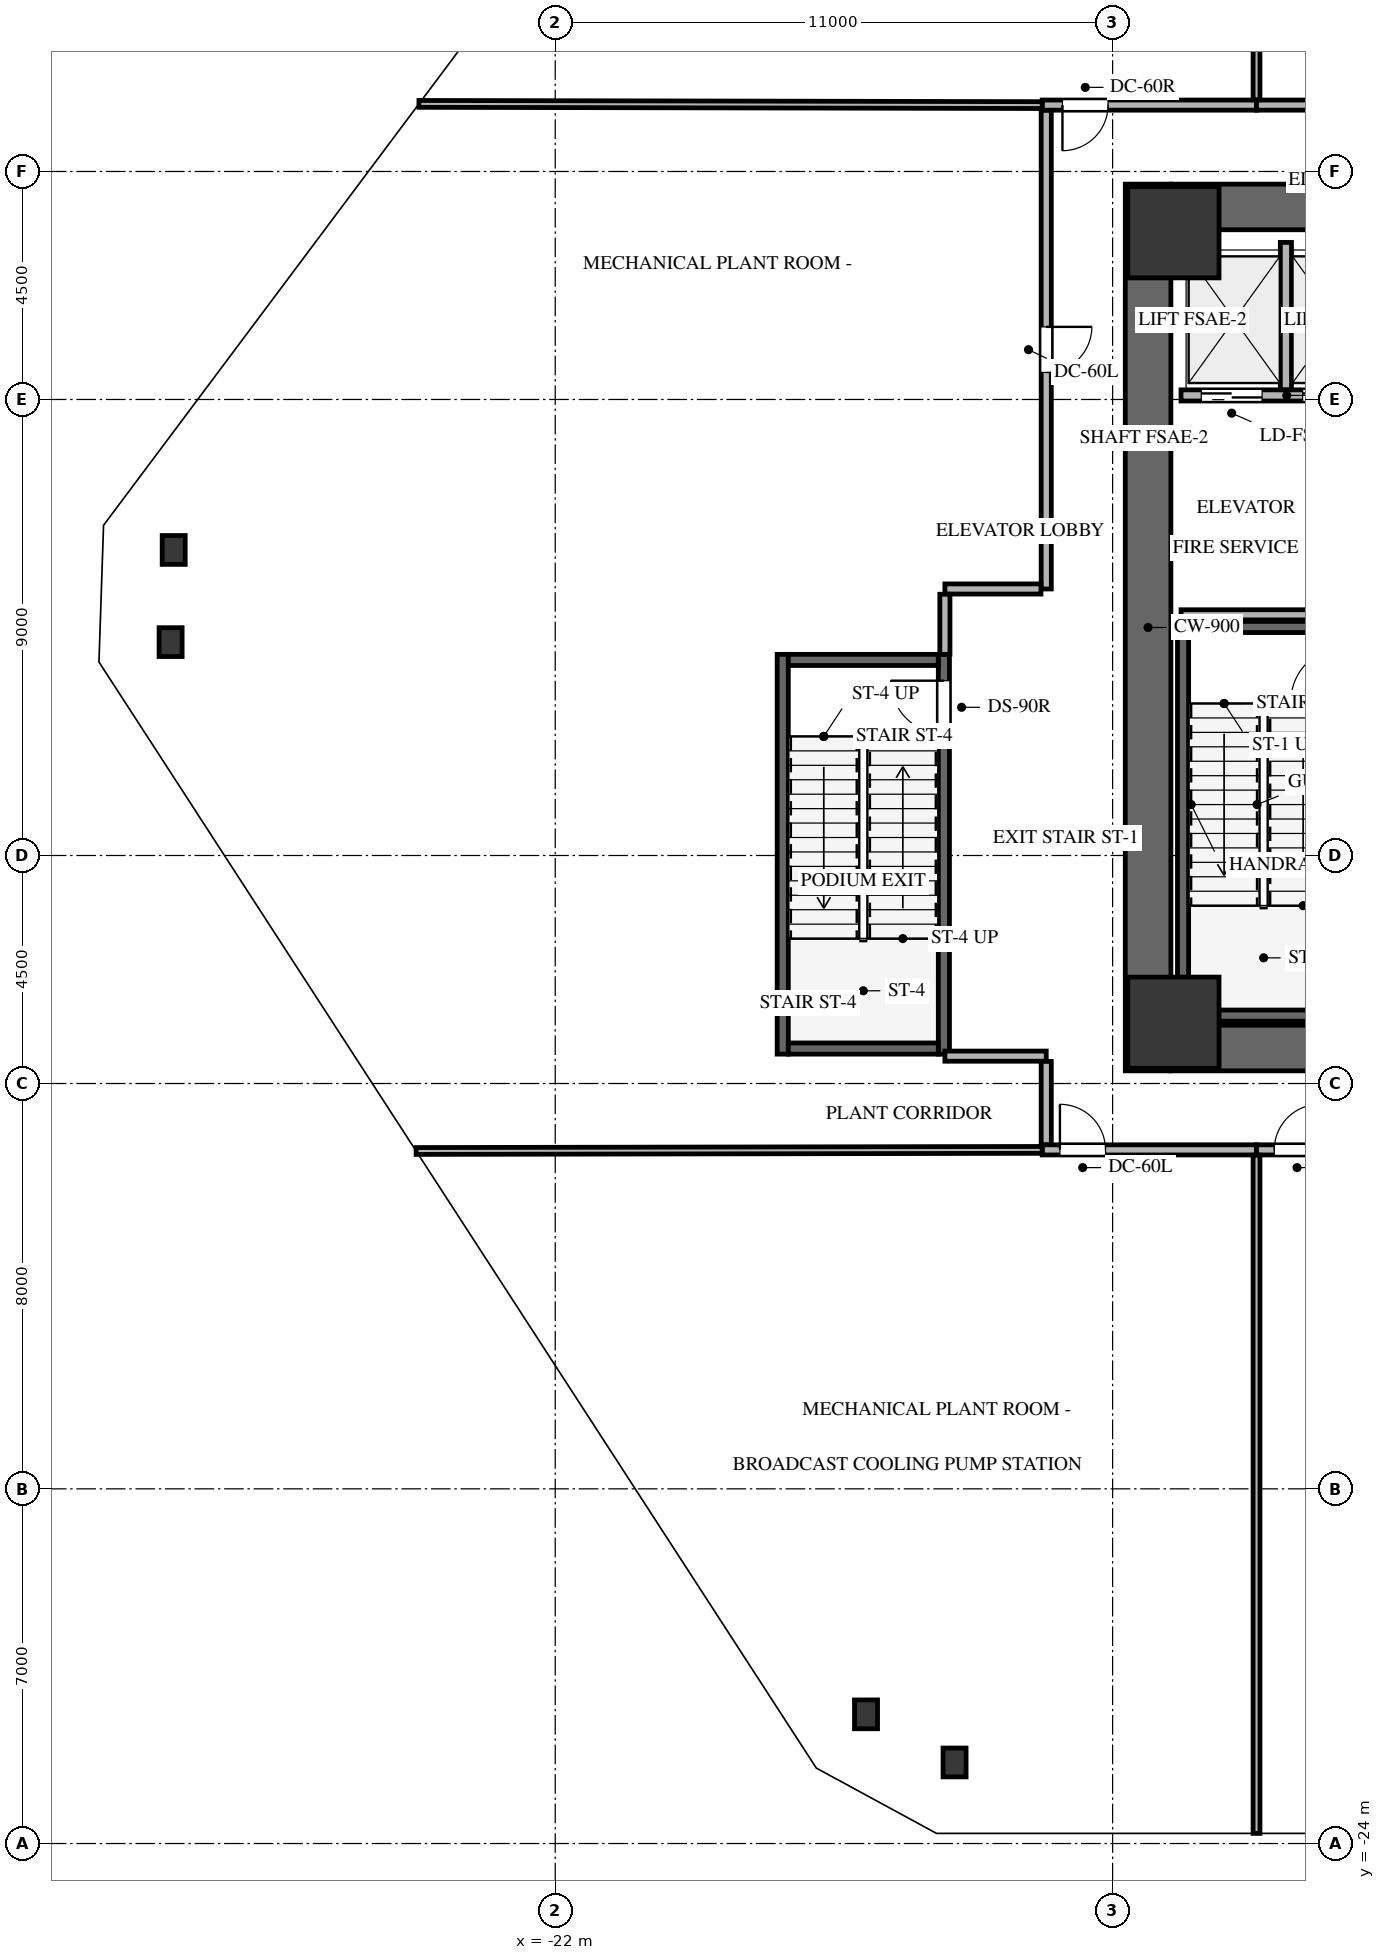
"""IFC4 building model, lengths in metres.
Left out: names, types, materials, properties, quantities, classifications, styles, units other than length and angle.
Written with IfcOpenShell. Run it as: python <this file> out.ifc"""

import sys

from ifc_helpers import new_model, si_unit, direction, frame, frame_2d, origin, origin_2d, place, context, subcontext, project, spatial, rectangle, i_section, extrude, source, transform, mapped, element, fill, save


model = new_model("IFC4")
c1 = context("Model", 3, precision=1e-05, world=origin(), true_north=direction((0.0, 1.0)))
c2 = subcontext(c1, "Body", "Model", "MODEL_VIEW")
j1 = project(units=[si_unit("LENGTHUNIT", "METRE"), si_unit("PLANEANGLEUNIT", "RADIAN")], contexts=[c1])
p1 = place(None, origin())
s1 = spatial("IfcSite", under=j1, at=p1, CompositionType="ELEMENT")
p2 = place(p1, origin())
s2 = spatial("IfcBuilding", under=s1, at=p2, CompositionType="ELEMENT")
p3 = place(p2, frame((0.0, 0.0, 10.4)))
s3 = spatial("IfcBuildingStorey", under=s2, at=p3, CompositionType="ELEMENT", Elevation=10.4)
p4 = place(p3, frame((-10.3, -8.75, 0.0), z_axis=(0.0, 0.0, 1.0), x_axis=(0.0, 1.0, 0.0)))
e1 = element("IfcWall", 1, at=p4, inside=s3, PredefinedType="SHEAR", context=c2, shape_type="SweptSolid", body=[
    extrude(rectangle(XDim=17.5, YDim=0.9, at=frame_2d((8.75, 0.0))), origin(), (0.0, 0.0, 1.0), 5.2),
])
p5 = place(p3, frame((-9.85, -8.3, 0.0), z_axis=(0.0, 0.0, 1.0), x_axis=(1.0, 0.0, 0.0)))
e2 = element("IfcWall", 2, at=p5, inside=s3, PredefinedType="SHEAR", context=c2, shape_type="SweptSolid", body=[
    extrude(rectangle(XDim=7.75, YDim=0.9, at=frame_2d((3.875, 0.0))), origin(), (0.0, 0.0, 1.0), 5.2),
])
p6 = place(p3, frame((-9.85, 8.3, 0.0), z_axis=(0.0, 0.0, 1.0), x_axis=(1.0, 0.0, 0.0)))
e3 = element("IfcWall", 3, at=p6, inside=s3, PredefinedType="SHEAR", context=c2, shape_type="SweptSolid", body=[
    extrude(rectangle(XDim=19.7, YDim=0.9, at=frame_2d((9.85, 0.0))), origin(), (0.0, 0.0, 1.0), 5.2),
])
p7 = place(p3, frame((-9.61, 0.12, -0.35), z_axis=(0.0, 0.0, 1.0), x_axis=(0.0, -1.0, 0.0)))
e4 = element("IfcWall", 4, at=p7, inside=s3, PredefinedType="SHEAR", context=c2, shape_type="SweptSolid", body=[
    extrude(rectangle(XDim=7.89, YDim=0.22, at=frame_2d((3.945, 0.0))), origin(), (0.0, 0.0, 1.0), 5.23),
])
for number, where, z_axis, x_axis in (
    (5, (-9.5, -7.66, -0.35), (0.0, 0.0, 1.0), (1.0, 0.0, 0.0)),
    (6, (-6.54, 0.01, -0.35), (0.0, 0.0, 1.0), (-1.0, 0.0, 0.0)),
):
    element("IfcWall", number, at=place(p3, frame(where, z_axis=z_axis, x_axis=x_axis)), inside=s3, PredefinedType="SHEAR", context=c2, shape_type="SweptSolid", body=[
        extrude(rectangle(XDim=2.96, YDim=0.22, at=frame_2d((1.48, 0.0))), origin(), (0.0, 0.0, 1.0), 5.23),
    ])
p8 = place(p3, frame((-14.33, -8.42, -0.35), z_axis=(0.0, 0.0, 1.0), x_axis=(0.0, 1.0, 0.0)))
e7 = element("IfcWall", 7, at=p8, inside=s3, PredefinedType="SHEAR", context=c2, shape_type="SweptSolid", body=[
    extrude(rectangle(XDim=7.89, YDim=0.22, at=frame_2d((3.945, 0.0))), origin(), (0.0, 0.0, 1.0), 5.23),
])
p9 = place(p8, frame((6.32, 0.0, 0.0)))
e8 = element("IfcOpeningElement", 8, at=p9, cuts=e7, PredefinedType="OPENING", context=c2, shape_type="SweptSolid", body=[
    extrude(rectangle(XDim=1.05, YDim=2.15, at=frame_2d((0.525, 1.075))), frame((0.0, 0.12, 0.0), z_axis=(0.0, -1.0, 0.0), x_axis=(1.0, 0.0, 0.0)), (0.0, 0.0, 1.0), 0.24),
])
p10 = place(p3, frame((-17.51, -0.53, -0.35), z_axis=(0.0, 0.0, 1.0), x_axis=(0.0, -1.0, 0.0)))
e9 = element("IfcWall", 9, at=p10, inside=s3, PredefinedType="SHEAR", context=c2, shape_type="SweptSolid", body=[
    extrude(rectangle(XDim=7.89, YDim=0.22, at=frame_2d((3.945, 0.0))), origin(), (0.0, 0.0, 1.0), 5.23),
])
for number, where, z_axis, x_axis in (
    (10, (-17.4, -8.31, -0.35), (0.0, 0.0, 1.0), (1.0, 0.0, 0.0)),
    (11, (-14.44, -0.64, -0.35), (0.0, 0.0, 1.0), (-1.0, 0.0, 0.0)),
):
    element("IfcWall", number, at=place(p3, frame(where, z_axis=z_axis, x_axis=x_axis)), inside=s3, PredefinedType="SHEAR", context=c2, shape_type="SweptSolid", body=[
        extrude(rectangle(XDim=2.96, YDim=0.22, at=frame_2d((1.48, 0.0))), origin(), (0.0, 0.0, 1.0), 5.23),
    ])
m1 = source(origin(), c2, "Body", "SweptSolid", [
    extrude(rectangle(XDim=1.8, YDim=1.8, at=origin_2d()), origin(), (0.0, 0.0, 1.0), 5.23),
])
for number, where, z_axis, x_axis in (
    (12, (-9.8, -7.8, -0.35), (0.0, 0.0, 1.0), (1.0, 0.0, 0.0)),
    (13, (-9.8, 7.8, -0.35), (0.0, 0.0, 1.0), (1.0, 0.0, 0.0)),
):
    element("IfcColumn", number, at=place(p3, frame(where, z_axis=z_axis, x_axis=x_axis)), inside=s3, PredefinedType="COLUMN", context=c2, shape_type="MappedRepresentation", body=[
        mapped(m1, transform((0.0, 0.0, 0.0), x_axis=(1.0, 0.0, 0.0), y_axis=(0.0, 1.0, 0.0), z_axis=(0.0, 0.0, 1.0), scale=1.0)),
    ])
m2 = source(origin(), c2, "Body", "SweptSolid", [
    extrude(i_section(OverallWidth=0.454, OverallDepth=0.569, WebThickness=0.078, FlangeThickness=0.125, FilletRadius=0.031, at=origin_2d()), origin(), (0.0, 0.0, 1.0), 5.23),
])
for number, where, z_axis, x_axis in (
    (14, (-15.866, -21.451, -0.35), (0.0, 0.0, 1.0), (1.0, 0.0, 0.0)),
    (15, (-29.591, -0.289, -0.35), (0.0, 0.0, 1.0), (1.0, 0.0, 0.0)),
    (16, (-29.529, 1.531, -0.35), (0.0, 0.0, 1.0), (1.0, 0.0, 0.0)),
    (17, (-14.119, -22.4, -0.35), (0.0, 0.0, 1.0), (1.0, 0.0, 0.0)),
):
    element("IfcColumn", number, at=place(p3, frame(where, z_axis=z_axis, x_axis=x_axis)), inside=s3, PredefinedType="COLUMN", context=c2, shape_type="MappedRepresentation", body=[
        mapped(m2, transform((0.0, 0.0, 0.0), x_axis=(1.0, 0.0, 0.0), y_axis=(0.0, 1.0, 0.0), z_axis=(0.0, 0.0, 1.0), scale=1.0)),
    ])
p11 = place(p3, frame((-9.65, 4.58, 0.0), z_axis=(0.0, 0.0, 1.0), x_axis=(1.0, 0.0, 0.0)))
e18 = element("IfcWall", 18, at=p11, inside=s3, PredefinedType="SOLIDWALL", context=c2, shape_type="SweptSolid", body=[
    extrude(rectangle(XDim=4.175, YDim=0.22, at=frame_2d((2.087, 0.0))), origin(), (0.0, 0.0, 1.0), 4.865),
])
p12 = place(p11, frame((0.4, 0.0, 0.0)))
e19 = element("IfcOpeningElement", 19, at=p12, cuts=e18, PredefinedType="OPENING", context=c2, shape_type="SweptSolid", body=[
    extrude(rectangle(XDim=1.2, YDim=2.15, at=frame_2d((0.6, 1.075))), frame((0.0, 0.12, 0.0), z_axis=(0.0, -1.0, 0.0), x_axis=(1.0, 0.0, 0.0)), (0.0, 0.0, 1.0), 0.24),
])
p13 = place(p11, frame((2.4, 0.0, 0.0)))
e20 = element("IfcOpeningElement", 20, at=p13, cuts=e18, PredefinedType="OPENING", context=c2, shape_type="SweptSolid", body=[
    extrude(rectangle(XDim=1.2, YDim=2.15, at=frame_2d((0.6, 1.075))), frame((0.0, 0.12, 0.0), z_axis=(0.0, -1.0, 0.0), x_axis=(1.0, 0.0, 0.0)), (0.0, 0.0, 1.0), 0.24),
])
p14 = place(p3, frame((-7.58, 4.694, 0.0), z_axis=(0.0, 0.0, 1.0), x_axis=(0.0, 1.0, 0.0)))
e21 = element("IfcWall", 21, at=p14, inside=s3, PredefinedType="SOLIDWALL", context=c2, shape_type="SweptSolid", body=[
    extrude(rectangle(XDim=2.906, YDim=0.22, at=frame_2d((1.453, 0.0))), origin(), (0.0, 0.0, 1.0), 4.865),
])
p15 = place(p3, frame((-9.65, 0.25, 0.0), z_axis=(0.0, 0.0, 1.0), x_axis=(1.0, 0.0, 0.0)))
e22 = element("IfcWall", 22, at=p15, inside=s3, PredefinedType="SOLIDWALL", context=c2, shape_type="SweptSolid", body=[
    extrude(rectangle(XDim=4.27, YDim=0.2, at=frame_2d((2.135, 0.0))), origin(), (0.0, 0.0, 1.0), 4.865),
])
p16 = place(p3, frame((-8.16, 10.31, 0.0), z_axis=(0.0, 0.0, 1.0), x_axis=(-1.0, 0.0, 0.0)))
e23 = element("IfcWall", 23, at=p16, inside=s3, PredefinedType="SOLIDWALL", context=c2, shape_type="SweptSolid", body=[
    extrude(rectangle(XDim=4.23, YDim=0.2, at=frame_2d((2.115, 0.0))), origin(), (0.0, 0.0, 1.0), 3.787),
])
p17 = place(p16, frame((2.93, 0.0, 0.0)))
e24 = element("IfcOpeningElement", 24, at=p17, cuts=e23, PredefinedType="OPENING", context=c2, shape_type="SweptSolid", body=[
    extrude(rectangle(XDim=0.9, YDim=2.05, at=frame_2d((0.45, 1.025))), frame((0.0, 0.11, 0.0), z_axis=(0.0, -1.0, 0.0), x_axis=(1.0, 0.0, 0.0)), (0.0, 0.0, 1.0), 0.22),
])
p18 = place(p3, frame((-2.66, 10.31, 0.0), z_axis=(0.0, 0.0, 1.0), x_axis=(-1.0, 0.0, 0.0)))
e25 = element("IfcWall", 25, at=p18, inside=s3, PredefinedType="SOLIDWALL", context=c2, shape_type="SweptSolid", body=[
    extrude(rectangle(XDim=5.5, YDim=0.2, at=frame_2d((2.75, 0.0))), origin(), (0.0, 0.0, 1.0), 4.418),
])
p19 = place(p18, frame((2.3, 0.0, 0.0)))
e26 = element("IfcOpeningElement", 26, at=p19, cuts=e25, PredefinedType="OPENING", context=c2, shape_type="SweptSolid", body=[
    extrude(rectangle(XDim=0.9, YDim=2.05, at=frame_2d((0.45, 1.025))), frame((0.0, 0.11, 0.0), z_axis=(0.0, -1.0, 0.0), x_axis=(1.0, 0.0, 0.0)), (0.0, 0.0, 1.0), 0.22),
])
p20 = place(p3, frame((-12.39, -10.31, 0.0), z_axis=(0.0, 0.0, 1.0), x_axis=(1.0, 0.0, 0.0)))
e27 = element("IfcWall", 27, at=p20, inside=s3, PredefinedType="SOLIDWALL", context=c2, shape_type="SweptSolid", body=[
    extrude(rectangle(XDim=4.23, YDim=0.2, at=frame_2d((2.115, 0.0))), origin(), (0.0, 0.0, 1.0), 3.787),
])
p21 = place(p20, frame((0.35, 0.0, 0.0)))
e28 = element("IfcOpeningElement", 28, at=p21, cuts=e27, PredefinedType="OPENING", context=c2, shape_type="SweptSolid", body=[
    extrude(rectangle(XDim=0.9, YDim=2.05, at=frame_2d((0.45, 1.025))), frame((0.0, 0.11, 0.0), z_axis=(0.0, -1.0, 0.0), x_axis=(1.0, 0.0, 0.0)), (0.0, 0.0, 1.0), 0.22),
])
p22 = place(p3, frame((-8.16, -10.31, 0.0), z_axis=(0.0, 0.0, 1.0), x_axis=(1.0, 0.0, 0.0)))
e29 = element("IfcWall", 29, at=p22, inside=s3, PredefinedType="SOLIDWALL", context=c2, shape_type="SweptSolid", body=[
    extrude(rectangle(XDim=5.5, YDim=0.2, at=frame_2d((2.75, 0.0))), origin(), (0.0, 0.0, 1.0), 3.787),
])
p23 = place(p22, frame((0.35, 0.0, 0.0)))
e30 = element("IfcOpeningElement", 30, at=p23, cuts=e29, PredefinedType="OPENING", context=c2, shape_type="SweptSolid", body=[
    extrude(rectangle(XDim=0.9, YDim=2.05, at=frame_2d((0.45, 1.025))), frame((0.0, 0.11, 0.0), z_axis=(0.0, -1.0, 0.0), x_axis=(1.0, 0.0, 0.0)), (0.0, 0.0, 1.0), 0.22),
])
p24 = place(p3, frame((-12.31, 10.206, 0.0), z_axis=(0.0, 0.0, 1.0), x_axis=(0.0, -1.0, 0.0)))
e31 = element("IfcWall", 31, at=p24, inside=s3, PredefinedType="SOLIDWALL", context=c2, shape_type="SweptSolid", body=[
    extrude(rectangle(XDim=9.446, YDim=0.2, at=frame_2d((4.723, 0.0))), origin(), (0.0, 0.0, 1.0), 3.787),
])
p25 = place(p24, frame((4.273, 0.0, 0.0)))
e32 = element("IfcOpeningElement", 32, at=p25, cuts=e31, PredefinedType="OPENING", context=c2, shape_type="SweptSolid", body=[
    extrude(rectangle(XDim=0.9, YDim=2.05, at=frame_2d((0.45, 1.025))), frame((0.0, 0.11, 0.0), z_axis=(0.0, -1.0, 0.0), x_axis=(1.0, 0.0, 0.0)), (0.0, 0.0, 1.0), 0.22),
])
p26 = place(p3, frame((-12.414, 0.76, 0.0), z_axis=(0.0, 0.0, 1.0), x_axis=(-1.0, 0.0, 0.0)))
e33 = element("IfcWall", 33, at=p26, inside=s3, PredefinedType="SOLIDWALL", context=c2, shape_type="SweptSolid", body=[
    extrude(rectangle(XDim=1.896, YDim=0.2, at=frame_2d((0.948, 0.0))), origin(), (0.0, 0.0, 1.0), 4.865),
])
p27 = place(p3, frame((-14.31, -8.46, 0.0), z_axis=(0.0, 0.0, 1.0), x_axis=(1.0, 0.0, 0.0)))
e34 = element("IfcWall", 34, at=p27, inside=s3, PredefinedType="SOLIDWALL", context=c2, shape_type="SweptSolid", body=[
    extrude(rectangle(XDim=2.0, YDim=0.2, at=frame_2d((1.0, 0.0))), origin(), (0.0, 0.0, 1.0), 4.865),
])
p28 = place(p3, frame((-12.31, -8.564, 0.0), z_axis=(0.0, 0.0, 1.0), x_axis=(0.0, -1.0, 0.0)))
e35 = element("IfcWall", 35, at=p28, inside=s3, PredefinedType="SOLIDWALL", context=c2, shape_type="SweptSolid", body=[
    extrude(rectangle(XDim=1.642, YDim=0.2, at=frame_2d((0.821, 0.0))), origin(), (0.0, 0.0, 1.0), 3.787),
])
p29 = place(p3, frame((-14.31, 0.656, 0.0), z_axis=(0.0, 0.0, 1.0), x_axis=(0.0, -1.0, 0.0)))
e36 = element("IfcWall", 36, at=p29, inside=s3, PredefinedType="SOLIDWALL", context=c2, shape_type="SweptSolid", body=[
    extrude(rectangle(XDim=1.186, YDim=0.2, at=frame_2d((0.593, 0.0))), origin(), (0.0, 0.0, 1.0), 4.865),
])
p30 = place(p3, frame((-8.16, 23.8, 0.0), z_axis=(0.0, 0.0, 1.0), x_axis=(0.0, -1.0, 0.0)))
e37 = element("IfcWall", 37, at=p30, inside=s3, PredefinedType="PARTITIONING", context=c2, shape_type="SweptSolid", body=[
    extrude(rectangle(XDim=13.386, YDim=0.135, at=frame_2d((6.693, 0.0))), origin(), (0.0, 0.0, 1.0), 4.174),
])
p31 = place(p3, frame((-12.39, 10.31, 0.0), z_axis=(0.0, 0.0, 1.0), x_axis=(-0.999998146559, 0.001925325425, 0.0)))
e38 = element("IfcWall", 38, at=p31, inside=s3, PredefinedType="PARTITIONING", context=c2, shape_type="SweptSolid", body=[
    extrude(rectangle(XDim=12.3, YDim=0.135, at=frame_2d((6.15, 0.0))), origin(), (0.0, 0.0, 1.0), 4.174),
])
p32 = place(p3, frame((-8.16, -10.414, 0.0), z_axis=(0.0, 0.0, 1.0), x_axis=(0.0, -1.0, 0.0)))
e39 = element("IfcWall", 39, at=p32, inside=s3, PredefinedType="PARTITIONING", context=c2, shape_type="SweptSolid", body=[
    extrude(rectangle(XDim=13.386, YDim=0.135, at=frame_2d((6.693, 0.0))), origin(), (0.0, 0.0, 1.0), 3.787),
])
p33 = place(p3, frame((-24.746, -10.332, 0.0), z_axis=(0.0, 0.0, 1.0), x_axis=(0.999998453823, 0.001758508277, 0.0)))
e40 = element("IfcWall", 40, at=p33, inside=s3, PredefinedType="PARTITIONING", context=c2, shape_type="SweptSolid", body=[
    extrude(rectangle(XDim=12.356, YDim=0.135, at=frame_2d((6.178, 0.0))), origin(), (0.0, 0.0, 1.0), 3.787),
])
m3 = source(origin(), c2, "Body", "SweptSolid", [
    extrude(rectangle(XDim=1.05, YDim=2.15, at=frame_2d((0.525, 1.075))), frame((0.0, 0.025, 0.0), z_axis=(0.0, -1.0, 0.0), x_axis=(1.0, 0.0, 0.0)), (0.0, 0.0, 1.0), 0.05),
])
p34 = place(p9, origin())
e41 = element("IfcDoor", 41, at=p34, inside=s3, OperationType="SINGLE_SWING_RIGHT", PredefinedType="DOOR", context=c2, shape_type="MappedRepresentation", body=[
    mapped(m3, transform((0.0, 0.0, 0.0), x_axis=(1.0, 0.0, 0.0), y_axis=(0.0, 1.0, 0.0), z_axis=(0.0, 0.0, 1.0), scale=1.0)),
])
fill(e8, e41)
m4 = source(origin(), c2, "Body", "SweptSolid", [
    extrude(rectangle(XDim=1.2, YDim=2.15, at=frame_2d((0.6, 1.075))), frame((0.0, 0.025, 0.0), z_axis=(0.0, -1.0, 0.0), x_axis=(1.0, 0.0, 0.0)), (0.0, 0.0, 1.0), 0.05),
])
p35 = place(p12, origin())
e42 = element("IfcDoor", 42, at=p35, inside=s3, OperationType="DOUBLE_DOOR_SLIDING", PredefinedType="DOOR", context=c2, shape_type="MappedRepresentation", body=[
    mapped(m4, transform((0.0, 0.0, 0.0), x_axis=(1.0, 0.0, 0.0), y_axis=(0.0, 1.0, 0.0), z_axis=(0.0, 0.0, 1.0), scale=1.0)),
])
fill(e19, e42)
p36 = place(p13, origin())
e43 = element("IfcDoor", 43, at=p36, inside=s3, OperationType="DOUBLE_DOOR_SLIDING", PredefinedType="DOOR", context=c2, shape_type="MappedRepresentation", body=[
    mapped(m4, transform((0.0, 0.0, 0.0), x_axis=(1.0, 0.0, 0.0), y_axis=(0.0, 1.0, 0.0), z_axis=(0.0, 0.0, 1.0), scale=1.0)),
])
fill(e20, e43)
m5 = source(origin(), c2, "Body", "SweptSolid", [
    extrude(rectangle(XDim=0.9, YDim=2.05, at=frame_2d((0.45, 1.025))), frame((0.0, 0.025, 0.0), z_axis=(0.0, -1.0, 0.0), x_axis=(1.0, 0.0, 0.0)), (0.0, 0.0, 1.0), 0.05),
])
p37 = place(p17, origin())
e44 = element("IfcDoor", 44, at=p37, inside=s3, OperationType="SINGLE_SWING_RIGHT", PredefinedType="DOOR", context=c2, shape_type="MappedRepresentation", body=[
    mapped(m5, transform((0.0, 0.0, 0.0), x_axis=(1.0, 0.0, 0.0), y_axis=(0.0, 1.0, 0.0), z_axis=(0.0, 0.0, 1.0), scale=1.0)),
])
fill(e24, e44)
m6 = source(origin(), c2, "Body", "SweptSolid", [
    extrude(rectangle(XDim=0.9, YDim=2.05, at=frame_2d((0.45, 1.025))), frame((0.0, 0.025, 0.0), z_axis=(0.0, -1.0, 0.0), x_axis=(1.0, 0.0, 0.0)), (0.0, 0.0, 1.0), 0.05),
])
p38 = place(p21, origin())
e45 = element("IfcDoor", 45, at=p38, inside=s3, OperationType="SINGLE_SWING_LEFT", PredefinedType="DOOR", context=c2, shape_type="MappedRepresentation", body=[
    mapped(m6, transform((0.0, 0.0, 0.0), x_axis=(1.0, 0.0, 0.0), y_axis=(0.0, 1.0, 0.0), z_axis=(0.0, 0.0, 1.0), scale=1.0)),
])
fill(e28, e45)
p39 = place(p23, origin())
e46 = element("IfcDoor", 46, at=p39, inside=s3, OperationType="SINGLE_SWING_RIGHT", PredefinedType="DOOR", context=c2, shape_type="MappedRepresentation", body=[
    mapped(m5, transform((0.0, 0.0, 0.0), x_axis=(1.0, 0.0, 0.0), y_axis=(0.0, 1.0, 0.0), z_axis=(0.0, 0.0, 1.0), scale=1.0)),
])
fill(e30, e46)
p40 = place(p25, origin())
e47 = element("IfcDoor", 47, at=p40, inside=s3, OperationType="SINGLE_SWING_LEFT", PredefinedType="DOOR", context=c2, shape_type="MappedRepresentation", body=[
    mapped(m6, transform((0.0, 0.0, 0.0), x_axis=(1.0, 0.0, 0.0), y_axis=(0.0, 1.0, 0.0), z_axis=(0.0, 0.0, 1.0), scale=1.0)),
])
fill(e32, e47)
save(model, sys.argv[1])
